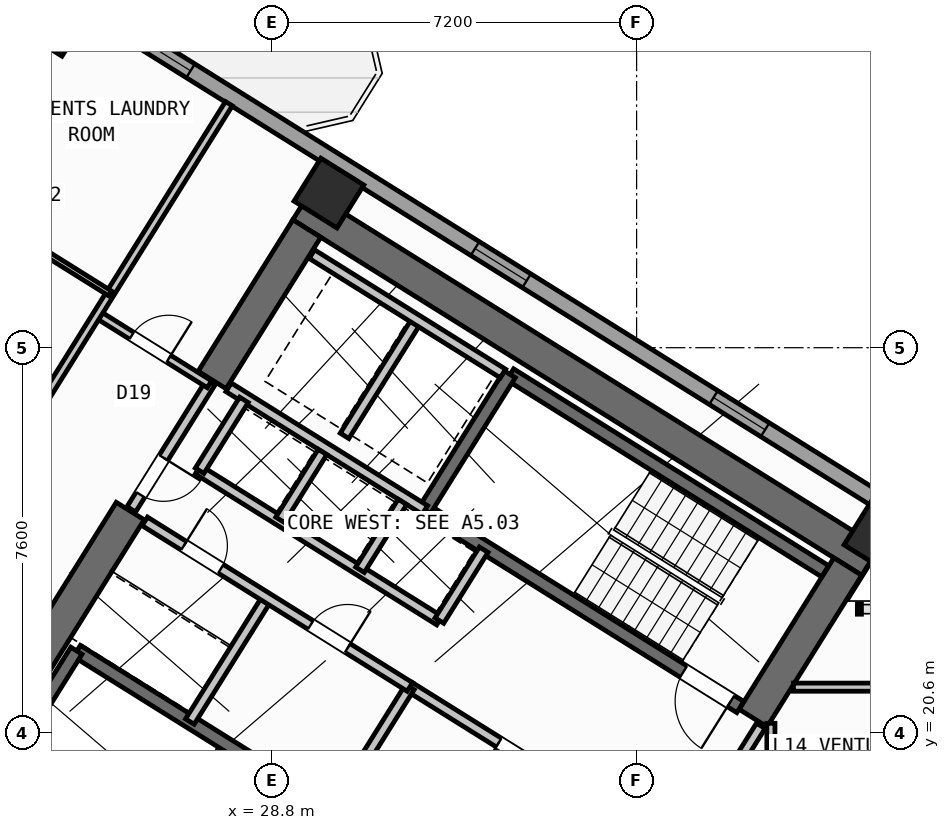
"""IFC4 building model, lengths in metres.
Left out: names, types, materials, properties, quantities, classifications, styles, units other than length and angle.
Written with IfcOpenShell. Run it as: python <this file> out.ifc"""

import sys

from ifc_helpers import new_model, si_unit, direction, frame, frame_2d, origin, origin_2d, place, context, subcontext, project, spatial, rectangle, hollow_rectangle, extrude, source, transform, mapped, element, fill, save


model = new_model("IFC4")
c1 = context("Model", 3, precision=1e-05, world=origin(), true_north=direction((0.0, 1.0)))
c2 = subcontext(c1, "Body", "Model", "MODEL_VIEW")
j1 = project(units=[si_unit("LENGTHUNIT", "METRE"), si_unit("PLANEANGLEUNIT", "RADIAN")], contexts=[c1])
p1 = place(None, origin())
s1 = spatial("IfcSite", under=j1, at=p1, CompositionType="ELEMENT")
p2 = place(p1, origin())
s2 = spatial("IfcBuilding", under=s1, at=p2, CompositionType="ELEMENT")
p3 = place(p2, frame((0.0, 0.0, 56.4)))
s3 = spatial("IfcBuildingStorey", under=s2, at=p3, CompositionType="ELEMENT", Elevation=56.4)
p4 = place(p3, frame((40.615, 23.983, 0.0), z_axis=(0.0, 0.0, 1.0), x_axis=(-0.848045953968, 0.529922692436, 0.0)))
e1 = element("IfcWall", 1, at=p4, inside=s3, PredefinedType="SHEAR", context=c2, shape_type="SweptSolid", body=[
    extrude(rectangle(XDim=13.24, YDim=0.65, at=frame_2d((6.62, 0.0))), origin(), (0.0, 0.0, 1.0), 3.35),
])
for number, where, z_axis, x_axis in (
    (2, (40.168, 23.88, 0.0), (0.0, 0.0, 1.0), (-0.53, -0.848, 0.0)),
    (3, (29.491, 30.552, 0.0), (0.0, 0.0, 1.0), (-0.53, -0.848, 0.0)),
):
    element("IfcWall", number, at=place(p3, frame(where, z_axis=z_axis, x_axis=x_axis)), inside=s3, PredefinedType="SHEAR", context=c2, shape_type="SweptSolid", body=[
        extrude(rectangle(XDim=3.525, YDim=0.65, at=frame_2d((1.763, 0.0))), origin(), (0.0, 0.0, 1.0), 3.35),
    ])
p5 = place(p3, frame((26.007, 24.976, 0.0), z_axis=(0.0, 0.0, 1.0), x_axis=(-0.529916319127, -0.848049936456, 0.0)))
e4 = element("IfcWall", 4, at=p5, inside=s3, PredefinedType="SHEAR", context=c2, shape_type="SweptSolid", body=[
    extrude(rectangle(XDim=6.375, YDim=0.65, at=frame_2d((3.188, 0.0))), origin(), (0.0, 0.0, 1.0), 3.35),
])
m1 = source(origin(), c2, "Body", "SweptSolid", [
    extrude(hollow_rectangle(XDim=1.0, YDim=1.0, WallThickness=0.04, at=origin_2d()), origin(), (0.0, 0.0, 1.0), 3.6),
])
for number, where, z_axis, x_axis in (
    (5, (40.783, 24.469, 0.0), (0.0, 0.0, 1.0), (-0.848, 0.53, 0.0)),
    (6, (29.928, 31.251, 0.0), (0.0, 0.0, 1.0), (-0.848, 0.53, 0.0)),
    (7, (24.5, 34.643, 0.0), (0.0, 0.0, 1.0), (-0.848, 0.53, 0.0)),
):
    element("IfcColumn", number, at=place(p3, frame(where, z_axis=z_axis, x_axis=x_axis)), inside=s3, PredefinedType="COLUMN", context=c2, shape_type="MappedRepresentation", body=[
        mapped(m1, transform((0.0, 0.0, 0.0), scale=1.0)),
    ])
p6 = place(p3, frame((29.268, 6.429, 0.0), z_axis=(0.0, 0.0, 1.0), x_axis=(-0.848049971435, 0.529916263149, 0.0)))
e8 = element("IfcWall", 8, at=p6, inside=s3, PredefinedType="STANDARD", context=c2, shape_type="SweptSolid", body=[
    extrude(rectangle(XDim=31.588, YDim=0.32, at=frame_2d((15.794, 0.0))), origin(), (0.0, 0.0, 1.0), 3.35),
])
p7 = place(p6, frame((16.235, 0.0, 0.0)))
e9 = element("IfcOpeningElement", 9, at=p7, cuts=e8, PredefinedType="OPENING", context=c2, shape_type="SweptSolid", body=[
    extrude(rectangle(XDim=1.2, YDim=2.15, at=frame_2d((0.6, 1.075))), frame((0.0, 0.17, 0.0), z_axis=(0.0, -1.0, 0.0), x_axis=(1.0, 0.0, 0.0)), (0.0, 0.0, 1.0), 0.34),
])
p8 = place(p6, frame((2.989, 0.0, 0.8)))
e10 = element("IfcOpeningElement", 10, at=p8, cuts=e8, PredefinedType="OPENING", context=c2, shape_type="SweptSolid", body=[
    extrude(rectangle(XDim=2.1, YDim=1.55, at=frame_2d((1.05, 0.775))), frame((0.0, 0.17, 0.0), z_axis=(0.0, -1.0, 0.0), x_axis=(1.0, 0.0, 0.0)), (0.0, 0.0, 1.0), 0.34),
])
p9 = place(p6, frame((8.359, 0.0, 0.8)))
e11 = element("IfcOpeningElement", 11, at=p9, cuts=e8, PredefinedType="OPENING", context=c2, shape_type="SweptSolid", body=[
    extrude(rectangle(XDim=2.1, YDim=1.55, at=frame_2d((1.05, 0.775))), frame((0.0, 0.17, 0.0), z_axis=(0.0, -1.0, 0.0), x_axis=(1.0, 0.0, 0.0)), (0.0, 0.0, 1.0), 0.34),
])
p10 = place(p6, frame((13.284, 0.0, 0.95)))
e12 = element("IfcOpeningElement", 12, at=p10, cuts=e8, PredefinedType="OPENING", context=c2, shape_type="SweptSolid", body=[
    extrude(rectangle(XDim=1.2, YDim=1.4, at=frame_2d((0.6, 0.7))), frame((0.0, 0.17, 0.0), z_axis=(0.0, -1.0, 0.0), x_axis=(1.0, 0.0, 0.0)), (0.0, 0.0, 1.0), 0.34),
])
p11 = place(p6, frame((22.374, 0.0, 0.95)))
e13 = element("IfcOpeningElement", 13, at=p11, cuts=e8, PredefinedType="OPENING", context=c2, shape_type="SweptSolid", body=[
    extrude(rectangle(XDim=1.2, YDim=1.4, at=frame_2d((0.6, 0.7))), frame((0.0, 0.17, 0.0), z_axis=(0.0, -1.0, 0.0), x_axis=(1.0, 0.0, 0.0)), (0.0, 0.0, 1.0), 0.34),
])
p12 = place(p6, frame((26.351, 0.0, 1.0)))
e14 = element("IfcOpeningElement", 14, at=p12, cuts=e8, PredefinedType="OPENING", context=c2, shape_type="SweptSolid", body=[
    extrude(rectangle(XDim=0.9, YDim=1.25, at=frame_2d((0.45, 0.625))), frame((0.0, 0.17, 0.0), z_axis=(0.0, -1.0, 0.0), x_axis=(1.0, 0.0, 0.0)), (0.0, 0.0, 1.0), 0.34),
])
p13 = place(p6, frame((29.052, 0.0, 0.85)))
e15 = element("IfcOpeningElement", 15, at=p13, cuts=e8, PredefinedType="OPENING", context=c2, shape_type="SweptSolid", body=[
    extrude(rectangle(XDim=1.8, YDim=1.5, at=frame_2d((0.9, 0.75))), frame((0.0, 0.17, 0.0), z_axis=(0.0, -1.0, 0.0), x_axis=(1.0, 0.0, 0.0)), (0.0, 0.0, 1.0), 0.34),
])
p14 = place(p3, frame((14.138, 41.825, 0.0), z_axis=(0.0, 0.0, 1.0), x_axis=(0.848046498049, -0.529921821731, 0.0)))
e16 = element("IfcWall", 16, at=p14, inside=s3, PredefinedType="STANDARD", context=c2, shape_type="SweptSolid", body=[
    extrude(rectangle(XDim=31.588, YDim=0.32, at=frame_2d((15.794, 0.0))), origin(), (0.0, 0.0, 1.0), 3.35),
])
p15 = place(p14, frame((9.772, 0.0, 0.0)))
e17 = element("IfcOpeningElement", 17, at=p15, cuts=e16, PredefinedType="OPENING", context=c2, shape_type="SweptSolid", body=[
    extrude(rectangle(XDim=1.05, YDim=2.15, at=frame_2d((0.525, 1.075))), frame((0.0, 0.17, 0.0), z_axis=(0.0, -1.0, 0.0), x_axis=(1.0, 0.0, 0.0)), (0.0, 0.0, 1.0), 0.34),
])
p16 = place(p14, frame((0.966, 0.0, 0.85)))
e18 = element("IfcOpeningElement", 18, at=p16, cuts=e16, PredefinedType="OPENING", context=c2, shape_type="SweptSolid", body=[
    extrude(rectangle(XDim=1.5, YDim=1.5, at=frame_2d((0.75, 0.75))), frame((0.0, 0.17, 0.0), z_axis=(0.0, -1.0, 0.0), x_axis=(1.0, 0.0, 0.0)), (0.0, 0.0, 1.0), 0.34),
])
p17 = place(p14, frame((4.121, 0.0, 1.0)))
e19 = element("IfcOpeningElement", 19, at=p17, cuts=e16, PredefinedType="OPENING", context=c2, shape_type="SweptSolid", body=[
    extrude(rectangle(XDim=0.9, YDim=1.25, at=frame_2d((0.45, 0.625))), frame((0.0, 0.17, 0.0), z_axis=(0.0, -1.0, 0.0), x_axis=(1.0, 0.0, 0.0)), (0.0, 0.0, 1.0), 0.34),
])
p18 = place(p14, frame((13.899, 0.0, 0.85)))
e20 = element("IfcOpeningElement", 20, at=p18, cuts=e16, PredefinedType="OPENING", context=c2, shape_type="SweptSolid", body=[
    extrude(rectangle(XDim=1.5, YDim=1.5, at=frame_2d((0.75, 0.75))), frame((0.0, 0.17, 0.0), z_axis=(0.0, -1.0, 0.0), x_axis=(1.0, 0.0, 0.0)), (0.0, 0.0, 1.0), 0.34),
])
p19 = place(p14, frame((22.019, 0.0, 0.95)))
e21 = element("IfcOpeningElement", 21, at=p19, cuts=e16, PredefinedType="OPENING", context=c2, shape_type="SweptSolid", body=[
    extrude(rectangle(XDim=1.2, YDim=1.4, at=frame_2d((0.6, 0.7))), frame((0.0, 0.17, 0.0), z_axis=(0.0, -1.0, 0.0), x_axis=(1.0, 0.0, 0.0)), (0.0, 0.0, 1.0), 0.34),
])
p20 = place(p14, frame((27.569, 0.0, 0.95)))
e22 = element("IfcOpeningElement", 22, at=p20, cuts=e16, PredefinedType="OPENING", context=c2, shape_type="SweptSolid", body=[
    extrude(rectangle(XDim=1.2, YDim=1.4, at=frame_2d((0.6, 0.7))), frame((0.0, 0.17, 0.0), z_axis=(0.0, -1.0, 0.0), x_axis=(1.0, 0.0, 0.0)), (0.0, 0.0, 1.0), 0.34),
])
p21 = place(p3, frame((31.28, 18.261, 0.0), z_axis=(0.0, 0.0, 1.0), x_axis=(-0.848051618787, 0.529913626805, 0.0)))
e23 = element("IfcWall", 23, at=p21, inside=s3, PredefinedType="SHEAR", context=c2, shape_type="SweptSolid", body=[
    extrude(rectangle(XDim=7.46, YDim=0.26, at=frame_2d((3.73, 0.0))), origin(), (0.0, 0.0, 1.0), 3.35),
])
p22 = place(p21, frame((0.36, 0.0, 0.0)))
e24 = element("IfcOpeningElement", 24, at=p22, cuts=e23, PredefinedType="OPENING", context=c2, shape_type="SweptSolid", body=[
    extrude(rectangle(XDim=0.86, YDim=2.05, at=frame_2d((0.43, 1.025))), frame((0.0, 0.14, 0.0), z_axis=(0.0, -1.0, 0.0), x_axis=(1.0, 0.0, 0.0)), (0.0, 0.0, 1.0), 0.28),
])
p23 = place(p3, frame((24.945, 22.22, 0.0), z_axis=(0.0, 0.0, 1.0), x_axis=(-0.529908658664, -0.84805472316, 0.0)))
e25 = element("IfcWall", 25, at=p23, inside=s3, PredefinedType="SHEAR", context=c2, shape_type="SweptSolid", body=[
    extrude(rectangle(XDim=3.16, YDim=0.26, at=frame_2d((1.58, 0.0))), origin(), (0.0, 0.0, 1.0), 3.35),
])
p24 = place(p3, frame((39.721, 23.788, 0.0), z_axis=(0.0, 0.0, 1.0), x_axis=(-0.848054434086, 0.529909121291, 0.0)))
e26 = element("IfcWall", 26, at=p24, inside=s3, PredefinedType="SHEAR", context=c2, shape_type="SweptSolid", body=[
    extrude(rectangle(XDim=7.33, YDim=0.26, at=frame_2d((3.665, 0.0))), origin(), (0.0, 0.0, 1.0), 3.35),
])
p25 = place(p3, frame((38.046, 21.108, 0.0), z_axis=(0.0, 0.0, 1.0), x_axis=(-0.848054434086, 0.529909121291, 0.0)))
e27 = element("IfcWall", 27, at=p25, inside=s3, PredefinedType="SHEAR", context=c2, shape_type="SweptSolid", body=[
    extrude(rectangle(XDim=7.33, YDim=0.26, at=frame_2d((3.665, 0.0))), origin(), (0.0, 0.0, 1.0), 3.35),
])
p26 = place(p25, frame((0.22, 0.0, 0.0)))
e28 = element("IfcOpeningElement", 28, at=p26, cuts=e27, PredefinedType="OPENING", context=c2, shape_type="SweptSolid", body=[
    extrude(rectangle(XDim=1.1, YDim=2.1, at=frame_2d((0.55, 1.05))), frame((0.0, 0.14, 0.0), z_axis=(0.0, -1.0, 0.0), x_axis=(1.0, 0.0, 0.0)), (0.0, 0.0, 1.0), 0.28),
])
p27 = place(p3, frame((33.496, 27.677, 0.0), z_axis=(0.0, 0.0, 1.0), x_axis=(-0.529908658664, -0.84805472316, 0.0)))
e29 = element("IfcWall", 29, at=p27, inside=s3, PredefinedType="SHEAR", context=c2, shape_type="SweptSolid", body=[
    extrude(rectangle(XDim=3.16, YDim=0.26, at=frame_2d((1.58, 0.0))), origin(), (0.0, 0.0, 1.0), 3.35),
])
p28 = place(p3, frame((36.374, 18.474, 0.0), z_axis=(0.0, 0.0, 1.0), x_axis=(-0.848051071577, 0.529914502535, 0.0)))
e30 = element("IfcWall", 30, at=p28, inside=s3, PredefinedType="STANDARD", context=c2, shape_type="SweptSolid", body=[
    extrude(rectangle(XDim=5.718, YDim=0.2, at=frame_2d((2.859, 0.0))), origin(), (0.0, 0.0, 1.0), 3.34),
])
p29 = place(p28, frame((2.498, 0.0, 0.0)))
e31 = element("IfcOpeningElement", 31, at=p29, cuts=e30, PredefinedType="OPENING", context=c2, shape_type="SweptSolid", body=[
    extrude(rectangle(XDim=1.15, YDim=2.1, at=frame_2d((0.575, 1.05))), frame((0.0, 0.11, 0.0), z_axis=(0.0, -1.0, 0.0), x_axis=(1.0, 0.0, 0.0)), (0.0, 0.0, 1.0), 0.22),
])
p30 = place(p3, frame((31.822, 24.998, 0.0), z_axis=(0.0, 0.0, 1.0), x_axis=(-0.848058348634, 0.529902856485, 0.0)))
e32 = element("IfcWall", 32, at=p30, inside=s3, PredefinedType="STANDARD", context=c2, shape_type="SweptSolid", body=[
    extrude(rectangle(XDim=4.568, YDim=0.2, at=frame_2d((2.284, 0.0))), origin(), (0.0, 0.0, 1.0), 3.34),
])
p31 = place(p3, frame((32.108, 22.814, 0.0), z_axis=(0.0, 0.0, 1.0), x_axis=(-0.848042229521, 0.529928652696, 0.0)))
e33 = element("IfcWall", 33, at=p31, inside=s3, PredefinedType="STANDARD", context=c2, shape_type="SweptSolid", body=[
    extrude(rectangle(XDim=5.62, YDim=0.2, at=frame_2d((2.81, 0.0))), origin(), (0.0, 0.0, 1.0), 3.34),
])
p32 = place(p3, frame((32.982, 24.213, 0.0), z_axis=(0.0, 0.0, 1.0), x_axis=(-0.529839334948, -0.84809803628, 0.0)))
e34 = element("IfcWall", 34, at=p32, inside=s3, PredefinedType="STANDARD", context=c2, shape_type="SweptSolid", body=[
    extrude(rectangle(XDim=1.65, YDim=0.2, at=frame_2d((0.825, 0.0))), origin(), (0.0, 0.0, 1.0), 3.34),
])
p33 = place(p3, frame((28.25, 27.17, 0.0), z_axis=(0.0, 0.0, 1.0), x_axis=(-0.529905827651, -0.848056492117, 0.0)))
e35 = element("IfcWall", 35, at=p33, inside=s3, PredefinedType="STANDARD", context=c2, shape_type="SweptSolid", body=[
    extrude(rectangle(XDim=1.65, YDim=0.2, at=frame_2d((0.825, 0.0))), origin(), (0.0, 0.0, 1.0), 3.34),
])
p34 = place(p3, frame((31.645, 28.716, 0.0), z_axis=(0.0, 0.0, 1.0), x_axis=(-0.52986693015, -0.848080795876, 0.0)))
e36 = element("IfcWall", 36, at=p34, inside=s3, PredefinedType="STANDARD", context=c2, shape_type="SweptSolid", body=[
    extrude(rectangle(XDim=2.66, YDim=0.2, at=frame_2d((1.33, 0.0))), origin(), (0.0, 0.0, 1.0), 3.34),
])
p35 = place(p3, frame((33.363, 27.69, 0.0), z_axis=(0.0, 0.0, 1.0), x_axis=(-0.848053806312, 0.529910125964, 0.0)))
e37 = element("IfcWall", 37, at=p35, inside=s3, PredefinedType="STANDARD", context=c2, shape_type="SweptSolid", body=[
    extrude(rectangle(XDim=4.448, YDim=0.2, at=frame_2d((2.224, 0.0))), origin(), (0.0, 0.0, 1.0), 3.34),
])
for number, where, z_axis, x_axis in (
    (38, (31.379, 25.156, 0.0), (0.0, 0.0, 1.0), (-0.53, -0.848, 0.0)),
    (39, (29.801, 26.142, 0.0), (0.0, 0.0, 1.0), (-0.53, -0.848, 0.0)),
):
    element("IfcWall", number, at=place(p3, frame(where, z_axis=z_axis, x_axis=x_axis)), inside=s3, PredefinedType="STANDARD", context=c2, shape_type="SweptSolid", body=[
        extrude(rectangle(XDim=1.58, YDim=0.2, at=frame_2d((0.79, 0.0))), origin(), (0.0, 0.0, 1.0), 3.34),
    ])
for number, where, z_axis, x_axis in (
    (40, (31.525, 21.504, 0.0), (0.0, 0.0, 1.0), (-0.53, -0.848, 0.0)),
    (41, (28.71, 23.263, 0.0), (0.0, 0.0, 1.0), (-0.53, -0.848, 0.0)),
):
    element("IfcWall", number, at=place(p3, frame(where, z_axis=z_axis, x_axis=x_axis)), inside=s3, PredefinedType="STANDARD", context=c2, shape_type="SweptSolid", body=[
        extrude(rectangle(XDim=2.88, YDim=0.2, at=frame_2d((1.44, 0.0))), origin(), (0.0, 0.0, 1.0), 3.34),
    ])
p36 = place(p3, frame((31.525, 21.504, 0.0), z_axis=(0.0, 0.0, 1.0), x_axis=(-0.848044998614, 0.529924221305, 0.0)))
e42 = element("IfcWall", 42, at=p36, inside=s3, PredefinedType="STANDARD", context=c2, shape_type="SweptSolid", body=[
    extrude(rectangle(XDim=6.168, YDim=0.2, at=frame_2d((3.084, 0.0))), origin(), (0.0, 0.0, 1.0), 3.34),
])
p37 = place(p36, frame((4.4, 0.0, 0.0)))
e43 = element("IfcOpeningElement", 43, at=p37, cuts=e42, PredefinedType="OPENING", context=c2, shape_type="SweptSolid", body=[
    extrude(rectangle(XDim=0.86, YDim=2.05, at=frame_2d((0.43, 1.025))), frame((0.0, 0.11, 0.0), z_axis=(0.0, -1.0, 0.0), x_axis=(1.0, 0.0, 0.0)), (0.0, 0.0, 1.0), 0.22),
])
p38 = place(p36, frame((1.45, 0.0, 0.0)))
e44 = element("IfcOpeningElement", 44, at=p38, cuts=e42, PredefinedType="OPENING", context=c2, shape_type="SweptSolid", body=[
    extrude(rectangle(XDim=0.86, YDim=2.05, at=frame_2d((0.43, 1.025))), frame((0.0, 0.11, 0.0), z_axis=(0.0, -1.0, 0.0), x_axis=(1.0, 0.0, 0.0)), (0.0, 0.0, 1.0), 0.22),
])
p39 = place(p3, frame((27.596, 27.52, 0.0), z_axis=(0.0, 0.0, 1.0), x_axis=(-0.529865479138, -0.848081702443, 0.0)))
e45 = element("IfcWall", 45, at=p39, inside=s3, PredefinedType="STANDARD", context=c2, shape_type="SweptSolid", body=[
    extrude(rectangle(XDim=2.96, YDim=0.2, at=frame_2d((1.48, 0.0))), origin(), (0.0, 0.0, 1.0), 3.34),
])
p40 = place(p39, frame((1.76, 0.0, 0.0)))
e46 = element("IfcOpeningElement", 46, at=p40, cuts=e45, PredefinedType="OPENING", context=c2, shape_type="SweptSolid", body=[
    extrude(rectangle(XDim=0.86, YDim=2.05, at=frame_2d((0.43, 1.025))), frame((0.0, 0.11, 0.0), z_axis=(0.0, -1.0, 0.0), x_axis=(1.0, 0.0, 0.0)), (0.0, 0.0, 1.0), 0.22),
])
p41 = place(p3, frame((27.57, 27.478, 0.0), z_axis=(0.0, 0.0, 1.0), x_axis=(-0.848050851465, 0.529914854792, 0.0)))
e47 = element("IfcWall", 47, at=p41, inside=s3, PredefinedType="PARTITIONING", context=c2, shape_type="SweptSolid", body=[
    extrude(rectangle(XDim=2.61, YDim=0.16, at=frame_2d((1.305, 0.0))), origin(), (0.0, 0.0, 1.0), 3.34),
])
p42 = place(p41, frame((0.95, 0.0, 0.0)))
e48 = element("IfcOpeningElement", 48, at=p42, cuts=e47, PredefinedType="OPENING", context=c2, shape_type="SweptSolid", body=[
    extrude(rectangle(XDim=0.86, YDim=2.05, at=frame_2d((0.43, 1.025))), frame((0.0, 0.09, 0.0), z_axis=(0.0, -1.0, 0.0), x_axis=(1.0, 0.0, 0.0)), (0.0, 0.0, 1.0), 0.18),
])
p43 = place(p3, frame((27.953, 33.016, 0.0), z_axis=(0.0, 0.0, 1.0), x_axis=(-0.529905022231, -0.848056995381, 0.0)))
e49 = element("IfcWall", 49, at=p43, inside=s3, PredefinedType="PARTITIONING", context=c2, shape_type="SweptSolid", body=[
    extrude(rectangle(XDim=11.45, YDim=0.16, at=frame_2d((5.725, 0.0))), origin(), (0.0, 0.0, 1.0), 3.34),
])
p44 = place(p3, frame((25.612, 29.269, 0.0), z_axis=(0.0, 0.0, 1.0), x_axis=(-0.84803087207, 0.529946827537, 0.0)))
e50 = element("IfcWall", 50, at=p44, inside=s3, PredefinedType="PARTITIONING", context=c2, shape_type="SweptSolid", body=[
    extrude(rectangle(XDim=3.79, YDim=0.11, at=frame_2d((1.895, 0.0))), origin(), (0.0, 0.0, 1.0), 3.34),
])
p45 = place(p44, frame((1.435, 0.0, 0.0)))
e51 = element("IfcOpeningElement", 51, at=p45, cuts=e50, PredefinedType="OPENING", context=c2, shape_type="SweptSolid", body=[
    extrude(rectangle(XDim=0.92, YDim=2.08, at=frame_2d((0.46, 1.04))), frame((0.0, 0.065, 0.0), z_axis=(0.0, -1.0, 0.0), x_axis=(1.0, 0.0, 0.0)), (0.0, 0.0, 1.0), 0.13),
])
p46 = place(p3, frame((38.451, 20.737, 0.0), z_axis=(0.0, 0.0, 1.0), x_axis=(-0.529924799939, -0.848044637038, 0.0)))
e52 = element("IfcWall", 52, at=p46, inside=s3, PredefinedType="STANDARD", context=c2, shape_type="SweptSolid", body=[
    extrude(rectangle(XDim=2.96, YDim=0.2, at=frame_2d((1.48, 0.0))), origin(), (0.0, 0.0, 1.0), 3.34),
])
p47 = place(p46, frame((1.46, 0.0, 0.0)))
e53 = element("IfcOpeningElement", 53, at=p47, cuts=e52, PredefinedType="OPENING", context=c2, shape_type="SweptSolid", body=[
    extrude(rectangle(XDim=0.86, YDim=2.05, at=frame_2d((0.43, 1.025))), frame((0.0, 0.11, 0.0), z_axis=(0.0, -1.0, 0.0), x_axis=(1.0, 0.0, 0.0)), (0.0, 0.0, 1.0), 0.22),
])
p48 = place(p3, frame((38.65, 17.93, 0.0), z_axis=(0.0, 0.0, 1.0), x_axis=(0.0, 1.0, 0.0)))
e54 = element("IfcWall", 54, at=p48, inside=s3, PredefinedType="PARTITIONING", context=c2, shape_type="SweptSolid", body=[
    extrude(rectangle(XDim=2.857, YDim=0.16, at=frame_2d((1.428, 0.0))), origin(), (0.0, 0.0, 1.0), 3.34),
])
p49 = place(p3, frame((39.095, 21.5, 0.0), z_axis=(0.0, 0.0, 1.0), x_axis=(1.0, 0.0, 0.0)))
e55 = element("IfcWall", 55, at=p49, inside=s3, PredefinedType="PARTITIONING", context=c2, shape_type="SweptSolid", body=[
    extrude(rectangle(XDim=7.094, YDim=0.16, at=frame_2d((3.547, 0.0))), origin(), (0.0, 0.0, 1.0), 3.34),
])
m2 = source(origin(), c2, "Body", "SweptSolid", [
    extrude(rectangle(XDim=1.5, YDim=1.5, at=frame_2d((0.75, 0.75))), frame((0.0, 0.03, 0.0), z_axis=(0.0, -1.0, 0.0), x_axis=(1.0, 0.0, 0.0)), (0.0, 0.0, 1.0), 0.06),
])
p50 = place(p18, origin())
e56 = element("IfcWindow", 56, at=p50, inside=s3, PartitioningType="SINGLE_PANEL", PredefinedType="WINDOW", context=c2, shape_type="MappedRepresentation", body=[
    mapped(m2, transform((0.0, 0.0, 0.0), scale=1.0)),
])
fill(e20, e56)
m3 = source(origin(), c2, "Body", "SweptSolid", [
    extrude(rectangle(XDim=1.2, YDim=1.4, at=frame_2d((0.6, 0.7))), frame((0.0, 0.03, 0.0), z_axis=(0.0, -1.0, 0.0), x_axis=(1.0, 0.0, 0.0)), (0.0, 0.0, 1.0), 0.06),
])
p51 = place(p19, origin())
e57 = element("IfcWindow", 57, at=p51, inside=s3, PartitioningType="SINGLE_PANEL", PredefinedType="WINDOW", context=c2, shape_type="MappedRepresentation", body=[
    mapped(m3, transform((0.0, 0.0, 0.0), scale=1.0)),
])
fill(e21, e57)
p52 = place(p20, origin())
e58 = element("IfcWindow", 58, at=p52, inside=s3, PartitioningType="SINGLE_PANEL", PredefinedType="WINDOW", context=c2, shape_type="MappedRepresentation", body=[
    mapped(m3, transform((0.0, 0.0, 0.0), scale=1.0)),
])
fill(e22, e58)
m4 = source(origin(), c2, "Body", "SweptSolid", [
    extrude(rectangle(XDim=1.1, YDim=2.1, at=frame_2d((0.55, 1.05))), frame((0.0, 0.025, 0.0), z_axis=(0.0, -1.0, 0.0), x_axis=(1.0, 0.0, 0.0)), (0.0, 0.0, 1.0), 0.05),
])
p53 = place(p26, origin())
e59 = element("IfcDoor", 59, at=p53, inside=s3, OperationType="SINGLE_SWING_LEFT", PredefinedType="DOOR", context=c2, shape_type="MappedRepresentation", body=[
    mapped(m4, transform((0.0, 0.0, 0.0), scale=1.0)),
])
fill(e28, e59)
m5 = source(origin(), c2, "Body", "SweptSolid", [
    extrude(rectangle(XDim=1.15, YDim=2.1, at=frame_2d((0.575, 1.05))), frame((0.0, 0.025, 0.0), z_axis=(0.0, -1.0, 0.0), x_axis=(1.0, 0.0, 0.0)), (0.0, 0.0, 1.0), 0.05),
])
p54 = place(p29, origin())
e60 = element("IfcDoor", 60, at=p54, inside=s3, OperationType="SINGLE_SWING_RIGHT", PredefinedType="DOOR", context=c2, shape_type="MappedRepresentation", body=[
    mapped(m5, transform((0.0, 0.0, 0.0), scale=1.0)),
])
fill(e31, e60)
m6 = source(origin(), c2, "Body", "SweptSolid", [
    extrude(rectangle(XDim=0.86, YDim=2.05, at=frame_2d((0.43, 1.025))), frame((0.0, 0.025, 0.0), z_axis=(0.0, -1.0, 0.0), x_axis=(1.0, 0.0, 0.0)), (0.0, 0.0, 1.0), 0.05),
])
p55 = place(p37, frame((0.86, 0.0, 0.0), z_axis=(0.0, 0.0, 1.0), x_axis=(-1.0, 0.0, 0.0)))
e61 = element("IfcDoor", 61, at=p55, inside=s3, OperationType="SINGLE_SWING_LEFT", PredefinedType="DOOR", context=c2, shape_type="MappedRepresentation", body=[
    mapped(m6, transform((0.0, 0.0, 0.0), scale=1.0)),
])
fill(e43, e61)
p56 = place(p38, frame((0.86, 0.0, 0.0), z_axis=(0.0, 0.0, 1.0), x_axis=(-1.0, 0.0, 0.0)))
e62 = element("IfcDoor", 62, at=p56, inside=s3, OperationType="SINGLE_SWING_RIGHT", PredefinedType="DOOR", context=c2, shape_type="MappedRepresentation", body=[
    mapped(m6, transform((0.0, 0.0, 0.0), scale=1.0)),
])
fill(e44, e62)
p57 = place(p42, frame((0.86, 0.0, 0.0), z_axis=(0.0, 0.0, 1.0), x_axis=(-1.0, 0.0, 0.0)))
e63 = element("IfcDoor", 63, at=p57, inside=s3, OperationType="SINGLE_SWING_RIGHT", PredefinedType="DOOR", context=c2, shape_type="MappedRepresentation", body=[
    mapped(m6, transform((0.0, 0.0, 0.0), scale=1.0)),
])
fill(e48, e63)
p58 = place(p40, origin())
e64 = element("IfcDoor", 64, at=p58, inside=s3, OperationType="SINGLE_SWING_LEFT", PredefinedType="DOOR", context=c2, shape_type="MappedRepresentation", body=[
    mapped(m6, transform((0.0, 0.0, 0.0), scale=1.0)),
])
fill(e46, e64)
save(model, sys.argv[1])
